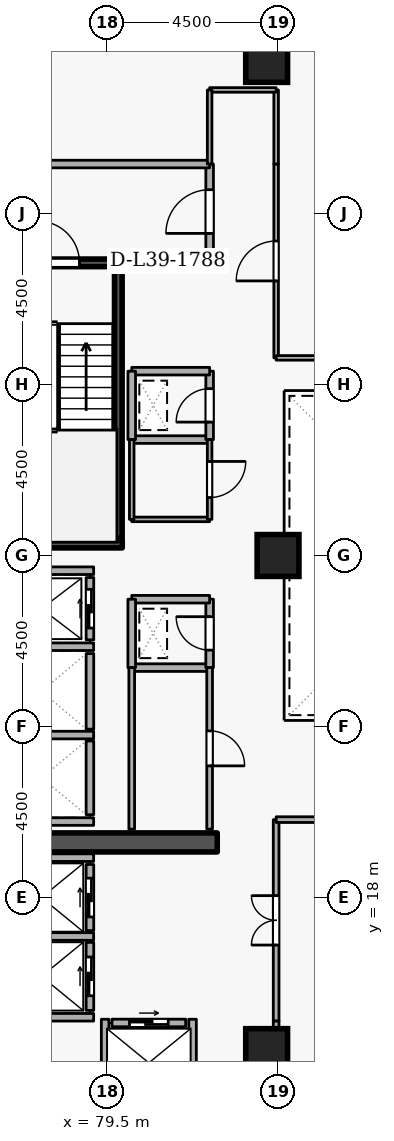
"""IFC4 building model, lengths in metres.
Left out: names, types, materials, properties, quantities, classifications, styles, units other than length and angle.
Written with IfcOpenShell. Run it as: python <this file> out.ifc"""

import sys

from ifc_helpers import new_model, si_unit, direction, frame, frame_2d, origin, origin_2d, place, context, subcontext, project, spatial, rectangle, extrude, element, fill, save


model = new_model("IFC4")
c1 = context("Model", 3, precision=1e-05, world=origin(), true_north=direction((0.0, 1.0)))
c2 = subcontext(c1, "Body", "Model", "MODEL_VIEW")
j1 = project(units=[si_unit("LENGTHUNIT", "METRE"), si_unit("PLANEANGLEUNIT", "RADIAN")], contexts=[c1])
p1 = place(None, origin())
s1 = spatial("IfcSite", under=j1, at=p1, CompositionType="ELEMENT")
p2 = place(p1, origin())
s2 = spatial("IfcBuilding", under=s1, at=p2, CompositionType="ELEMENT")
p3 = place(p2, frame((0.0, 0.0, 149.1)))
s3 = spatial("IfcBuildingStorey", under=s2, at=p3, CompositionType="ELEMENT", Elevation=149.1)
p4 = place(p3, frame((76.6, 19.45, 0.0), z_axis=(0.0, 0.0, 1.0), x_axis=(1.0, 0.0, 0.0)))
e1 = element("IfcWall", 1, at=p4, inside=s3, PredefinedType="SHEAR", context=c2, shape_type="SweptSolid", body=[
    extrude(rectangle(XDim=5.8, YDim=0.5, at=frame_2d((2.9, 0.0))), origin(), (0.0, 0.0, 1.0), 3.6),
])
for number, where, z_axis, x_axis in (
    (2, (83.7, 14.0, 0.0), (0.0, 0.0, 1.0), (1.0, 0.0, 0.0)),
    (3, (83.7, 40.0, 0.0), (0.0, 0.0, 1.0), (1.0, 0.0, 0.0)),
    (4, (84.0, 27.0, 0.0), (0.0, 0.0, 1.0), (1.0, 0.0, 0.0)),
):
    element("IfcColumn", number, at=place(p3, frame(where, z_axis=z_axis, x_axis=x_axis)), inside=s3, PredefinedType="COLUMN", context=c2, shape_type="SweptSolid", body=[
        extrude(rectangle(XDim=1.1, YDim=1.1, at=origin_2d()), origin(), (0.0, 0.0, 1.0), 3.6),
    ])
p5 = place(p3, frame((79.05, 24.78, 0.0), z_axis=(0.0, 0.0, 1.0), x_axis=(0.0, 1.0, 0.0)))
e5 = element("IfcWall", 5, at=p5, inside=s3, PredefinedType="STANDARD", context=c2, shape_type="SweptSolid", body=[
    extrude(rectangle(XDim=1.64, YDim=0.2, at=frame_2d((0.82, 0.0))), origin(), (0.0, 0.0, 1.0), 3.3),
])
p6 = place(p5, frame((0.31, 0.0, 0.0)))
e6 = element("IfcOpeningElement", 6, at=p6, cuts=e5, PredefinedType="OPENING", context=c2, shape_type="SweptSolid", body=[
    extrude(rectangle(XDim=1.02, YDim=2.06, at=frame_2d((0.51, 1.03))), frame((0.0, 0.11, 0.0), z_axis=(0.0, -1.0, 0.0), x_axis=(1.0, 0.0, 0.0)), (0.0, 0.0, 1.0), 0.22),
])
p7 = place(p3, frame((79.05, 22.43, 0.0), z_axis=(0.0, 0.0, 1.0), x_axis=(0.0, 1.0, 0.0)))
e7 = element("IfcWall", 7, at=p7, inside=s3, PredefinedType="STANDARD", context=c2, shape_type="SweptSolid", body=[
    extrude(rectangle(XDim=1.99, YDim=0.2, at=frame_2d((0.995, 0.0))), origin(), (0.0, 0.0, 1.0), 3.3),
])
p8 = place(p3, frame((79.05, 20.18, 0.0), z_axis=(0.0, 0.0, 1.0), x_axis=(0.0, 1.0, 0.0)))
e8 = element("IfcWall", 8, at=p8, inside=s3, PredefinedType="STANDARD", context=c2, shape_type="SweptSolid", body=[
    extrude(rectangle(XDim=1.94, YDim=0.2, at=frame_2d((0.97, 0.0))), origin(), (0.0, 0.0, 1.0), 3.3),
])
p9 = place(p3, frame((79.05, 17.13, 0.0), z_axis=(0.0, 0.0, 1.0), x_axis=(0.0, 1.0, 0.0)))
e9 = element("IfcWall", 9, at=p9, inside=s3, PredefinedType="STANDARD", context=c2, shape_type="SweptSolid", body=[
    extrude(rectangle(XDim=1.74, YDim=0.2, at=frame_2d((0.87, 0.0))), origin(), (0.0, 0.0, 1.0), 3.3),
])
p10 = place(p9, frame((0.36, 0.0, 0.0)))
e10 = element("IfcOpeningElement", 10, at=p10, cuts=e9, PredefinedType="OPENING", context=c2, shape_type="SweptSolid", body=[
    extrude(rectangle(XDim=1.02, YDim=2.06, at=frame_2d((0.51, 1.03))), frame((0.0, 0.11, 0.0), z_axis=(0.0, -1.0, 0.0), x_axis=(1.0, 0.0, 0.0)), (0.0, 0.0, 1.0), 0.22),
])
p11 = place(p3, frame((79.05, 15.03, 0.0), z_axis=(0.0, 0.0, 1.0), x_axis=(0.0, 1.0, 0.0)))
e11 = element("IfcWall", 11, at=p11, inside=s3, PredefinedType="STANDARD", context=c2, shape_type="SweptSolid", body=[
    extrude(rectangle(XDim=1.79, YDim=0.2, at=frame_2d((0.895, 0.0))), origin(), (0.0, 0.0, 1.0), 3.3),
])
p12 = place(p11, frame((0.385, 0.0, 0.0)))
e12 = element("IfcOpeningElement", 12, at=p12, cuts=e11, PredefinedType="OPENING", context=c2, shape_type="SweptSolid", body=[
    extrude(rectangle(XDim=1.02, YDim=2.06, at=frame_2d((0.51, 1.03))), frame((0.0, 0.11, 0.0), z_axis=(0.0, -1.0, 0.0), x_axis=(1.0, 0.0, 0.0)), (0.0, 0.0, 1.0), 0.22),
])
p13 = place(p3, frame((79.63, 14.7, 0.0), z_axis=(0.0, 0.0, 1.0), x_axis=(1.0, 0.0, 0.0)))
e13 = element("IfcWall", 13, at=p13, inside=s3, PredefinedType="STANDARD", context=c2, shape_type="SweptSolid", body=[
    extrude(rectangle(XDim=1.94, YDim=0.2, at=frame_2d((0.97, 0.0))), origin(), (0.0, 0.0, 1.0), 3.3),
])
p14 = place(p13, frame((0.46, 0.0, 0.0)))
e14 = element("IfcOpeningElement", 14, at=p14, cuts=e13, PredefinedType="OPENING", context=c2, shape_type="SweptSolid", body=[
    extrude(rectangle(XDim=1.02, YDim=2.06, at=frame_2d((0.51, 1.03))), frame((0.0, 0.11, 0.0), z_axis=(0.0, -1.0, 0.0), x_axis=(1.0, 0.0, 0.0)), (0.0, 0.0, 1.0), 0.22),
])
for number, where, z_axis, x_axis in (
    (15, (76.612, 26.6, 0.0), (0.0, 0.0, 1.0), (1.0, 0.0, 0.0)),
    (16, (76.612, 24.6, 0.0), (0.0, 0.0, 1.0), (1.0, 0.0, 0.0)),
    (17, (76.612, 22.275, 0.0), (0.0, 0.0, 1.0), (1.0, 0.0, 0.0)),
    (18, (76.612, 20.0, 0.0), (0.0, 0.0, 1.0), (1.0, 0.0, 0.0)),
):
    element("IfcWall", number, at=place(p3, frame(where, z_axis=z_axis, x_axis=x_axis)), inside=s3, PredefinedType="STANDARD", context=c2, shape_type="SweptSolid", body=[
        extrude(rectangle(XDim=2.536, YDim=0.2, at=frame_2d((1.268, 0.0))), origin(), (0.0, 0.0, 1.0), 3.3),
    ])
p15 = place(p3, frame((76.402, 19.05, 0.0), z_axis=(0.0, 0.0, 1.0), x_axis=(1.0, 0.0, 0.0)))
e19 = element("IfcWall", 19, at=p15, inside=s3, PredefinedType="STANDARD", context=c2, shape_type="SweptSolid", body=[
    extrude(rectangle(XDim=2.746, YDim=0.2, at=frame_2d((1.373, 0.0))), origin(), (0.0, 0.0, 1.0), 2.505),
])
p16 = place(p3, frame((76.402, 16.975, 0.0), z_axis=(0.0, 0.0, 1.0), x_axis=(1.0, 0.0, 0.0)))
e20 = element("IfcWall", 20, at=p16, inside=s3, PredefinedType="STANDARD", context=c2, shape_type="SweptSolid", body=[
    extrude(rectangle(XDim=2.746, YDim=0.2, at=frame_2d((1.373, 0.0))), origin(), (0.0, 0.0, 1.0), 3.3),
])
p17 = place(p3, frame((76.512, 14.85, 0.0), z_axis=(0.0, 0.0, 1.0), x_axis=(1.0, 0.0, 0.0)))
e21 = element("IfcWall", 21, at=p17, inside=s3, PredefinedType="STANDARD", context=c2, shape_type="SweptSolid", body=[
    extrude(rectangle(XDim=2.636, YDim=0.2, at=frame_2d((1.318, 0.0))), origin(), (0.0, 0.0, 1.0), 3.3),
])
for number, where, z_axis, x_axis in (
    (22, (81.75, 12.612, 0.0), (0.0, 0.0, 1.0), (0.0, 1.0, 0.0)),
    (23, (79.45, 12.612, 0.0), (0.0, 0.0, 1.0), (0.0, 1.0, 0.0)),
):
    element("IfcWall", number, at=place(p3, frame(where, z_axis=z_axis, x_axis=x_axis)), inside=s3, PredefinedType="STANDARD", context=c2, shape_type="SweptSolid", body=[
        extrude(rectangle(XDim=2.186, YDim=0.2, at=frame_2d((1.093, 0.0))), origin(), (0.0, 0.0, 1.0), 3.3),
    ])
p18 = place(p3, frame((76.55, 34.7, 0.0), z_axis=(0.0, 0.0, 1.0), x_axis=(1.0, 0.0, 0.0)))
e24 = element("IfcWall", 24, at=p18, inside=s3, PredefinedType="SHEAR", context=c2, shape_type="SweptSolid", body=[
    extrude(rectangle(XDim=3.35, YDim=0.2, at=frame_2d((1.675, 0.0))), origin(), (0.0, 0.0, 1.0), 3.6),
])
p19 = place(p18, frame((1.125, 0.0, 0.0)))
e25 = element("IfcOpeningElement", 25, at=p19, cuts=e24, PredefinedType="OPENING", context=c2, shape_type="SweptSolid", body=[
    extrude(rectangle(XDim=1.1, YDim=2.1, at=frame_2d((0.55, 1.05))), frame((0.0, 0.11, 0.0), z_axis=(0.0, -1.0, 0.0), x_axis=(1.0, 0.0, 0.0)), (0.0, 0.0, 1.0), 0.22),
])
p20 = place(p3, frame((79.9, 27.3, 0.0), z_axis=(0.0, 0.0, 1.0), x_axis=(-1.0, 0.0, 0.0)))
e26 = element("IfcWall", 26, at=p20, inside=s3, PredefinedType="SHEAR", context=c2, shape_type="SweptSolid", body=[
    extrude(rectangle(XDim=3.35, YDim=0.2, at=frame_2d((1.675, 0.0))), origin(), (0.0, 0.0, 1.0), 3.6),
])
p21 = place(p3, frame((79.797, 27.45, 0.0), z_axis=(0.0, 0.0, 1.0), x_axis=(0.0, 1.0, 0.0)))
e27 = element("IfcWall", 27, at=p21, inside=s3, PredefinedType="SHEAR", context=c2, shape_type="SweptSolid", body=[
    extrude(rectangle(XDim=7.1, YDim=0.2, at=frame_2d((3.55, 0.0))), origin(), (0.0, 0.0, 1.0), 3.6),
])
p22 = place(p3, frame((79.9, 34.8, 0.0), z_axis=(0.0, 0.0, 1.0), x_axis=(1.0, 0.0, 0.0)))
e28 = element("IfcWall", 28, at=p22, inside=s3, PredefinedType="STANDARD", context=c2, shape_type="SweptSolid", body=[
    extrude(rectangle(XDim=2.3, YDim=0.2, at=frame_2d((1.15, 0.0))), origin(), (0.0, 0.0, 1.0), 2.505),
])
p23 = place(p3, frame((82.2, 34.8, 0.0), z_axis=(0.0, 0.0, 1.0), x_axis=(0.0, 1.0, 0.0)))
e29 = element("IfcWall", 29, at=p23, inside=s3, PredefinedType="STANDARD", context=c2, shape_type="SweptSolid", body=[
    extrude(rectangle(XDim=2.5, YDim=0.2, at=frame_2d((1.25, 0.0))), origin(), (0.0, 0.0, 1.0), 3.3),
])
p24 = place(p23, frame((0.675, 0.0, 0.0)))
e30 = element("IfcOpeningElement", 30, at=p24, cuts=e29, PredefinedType="OPENING", context=c2, shape_type="SweptSolid", body=[
    extrude(rectangle(XDim=1.15, YDim=2.1, at=frame_2d((0.575, 1.05))), frame((0.0, 0.11, 0.0), z_axis=(0.0, -1.0, 0.0), x_axis=(1.0, 0.0, 0.0)), (0.0, 0.0, 1.0), 0.22),
])
p25 = place(p3, frame((82.2, 37.3, 0.0), z_axis=(0.0, 0.0, 1.0), x_axis=(-1.0, 0.0, 0.0)))
e31 = element("IfcWall", 31, at=p25, inside=s3, PredefinedType="STANDARD", context=c2, shape_type="SweptSolid", body=[
    extrude(rectangle(XDim=5.7, YDim=0.2, at=frame_2d((2.85, 0.0))), origin(), (0.0, 0.0, 1.0), 3.3),
])
p26 = place(p3, frame((80.15, 24.05, 0.0), z_axis=(0.0, 0.0, 1.0), x_axis=(1.0, 0.0, 0.0)))
e32 = element("IfcWall", 32, at=p26, inside=s3, PredefinedType="STANDARD", context=c2, shape_type="SweptSolid", body=[
    extrude(rectangle(XDim=2.05, YDim=0.2, at=frame_2d((1.025, 0.0))), origin(), (0.0, 0.0, 1.0), 3.3),
])
p27 = place(p3, frame((82.2, 24.05, 0.0), z_axis=(0.0, 0.0, 1.0), x_axis=(0.0, 1.0, 0.0)))
e33 = element("IfcWall", 33, at=p27, inside=s3, PredefinedType="STANDARD", context=c2, shape_type="SweptSolid", body=[
    extrude(rectangle(XDim=1.8, YDim=0.2, at=frame_2d((0.9, 0.0))), origin(), (0.0, 0.0, 1.0), 3.3),
])
p28 = place(p27, frame((0.46, 0.0, 0.0)))
e34 = element("IfcOpeningElement", 34, at=p28, cuts=e33, PredefinedType="OPENING", context=c2, shape_type="SweptSolid", body=[
    extrude(rectangle(XDim=0.88, YDim=2.04, at=frame_2d((0.44, 1.02))), frame((0.0, 0.11, 0.0), z_axis=(0.0, -1.0, 0.0), x_axis=(1.0, 0.0, 0.0)), (0.0, 0.0, 1.0), 0.22),
])
p29 = place(p3, frame((82.2, 25.85, 0.0), z_axis=(0.0, 0.0, 1.0), x_axis=(-1.0, 0.0, 0.0)))
e35 = element("IfcWall", 35, at=p29, inside=s3, PredefinedType="STANDARD", context=c2, shape_type="SweptSolid", body=[
    extrude(rectangle(XDim=2.05, YDim=0.2, at=frame_2d((1.025, 0.0))), origin(), (0.0, 0.0, 1.0), 3.3),
])
p30 = place(p3, frame((80.15, 25.85, 0.0), z_axis=(0.0, 0.0, 1.0), x_axis=(0.0, -1.0, 0.0)))
e36 = element("IfcWall", 36, at=p30, inside=s3, PredefinedType="STANDARD", context=c2, shape_type="SweptSolid", body=[
    extrude(rectangle(XDim=1.8, YDim=0.2, at=frame_2d((0.9, 0.0))), origin(), (0.0, 0.0, 1.0), 3.3),
])
p31 = place(p3, frame((80.15, 30.05, 0.0), z_axis=(0.0, 0.0, 1.0), x_axis=(1.0, 0.0, 0.0)))
e37 = element("IfcWall", 37, at=p31, inside=s3, PredefinedType="STANDARD", context=c2, shape_type="SweptSolid", body=[
    extrude(rectangle(XDim=2.05, YDim=0.2, at=frame_2d((1.025, 0.0))), origin(), (0.0, 0.0, 1.0), 3.3),
])
p32 = place(p3, frame((82.2, 30.05, 0.0), z_axis=(0.0, 0.0, 1.0), x_axis=(0.0, 1.0, 0.0)))
e38 = element("IfcWall", 38, at=p32, inside=s3, PredefinedType="STANDARD", context=c2, shape_type="SweptSolid", body=[
    extrude(rectangle(XDim=1.8, YDim=0.2, at=frame_2d((0.9, 0.0))), origin(), (0.0, 0.0, 1.0), 3.3),
])
p33 = place(p32, frame((0.46, 0.0, 0.0)))
e39 = element("IfcOpeningElement", 39, at=p33, cuts=e38, PredefinedType="OPENING", context=c2, shape_type="SweptSolid", body=[
    extrude(rectangle(XDim=0.88, YDim=2.04, at=frame_2d((0.44, 1.02))), frame((0.0, 0.11, 0.0), z_axis=(0.0, -1.0, 0.0), x_axis=(1.0, 0.0, 0.0)), (0.0, 0.0, 1.0), 0.22),
])
p34 = place(p3, frame((82.2, 31.85, 0.0), z_axis=(0.0, 0.0, 1.0), x_axis=(-1.0, 0.0, 0.0)))
e40 = element("IfcWall", 40, at=p34, inside=s3, PredefinedType="STANDARD", context=c2, shape_type="SweptSolid", body=[
    extrude(rectangle(XDim=2.05, YDim=0.2, at=frame_2d((1.025, 0.0))), origin(), (0.0, 0.0, 1.0), 3.3),
])
p35 = place(p3, frame((80.15, 31.85, 0.0), z_axis=(0.0, 0.0, 1.0), x_axis=(0.0, -1.0, 0.0)))
e41 = element("IfcWall", 41, at=p35, inside=s3, PredefinedType="STANDARD", context=c2, shape_type="SweptSolid", body=[
    extrude(rectangle(XDim=1.8, YDim=0.2, at=frame_2d((0.9, 0.0))), origin(), (0.0, 0.0, 1.0), 3.3),
])
p36 = place(p3, frame((80.15, 19.8, 0.0), z_axis=(0.0, 0.0, 1.0), x_axis=(0.0, 1.0, 0.0)))
e42 = element("IfcWall", 42, at=p36, inside=s3, PredefinedType="PARTITIONING", context=c2, shape_type="SweptSolid", body=[
    extrude(rectangle(XDim=4.25, YDim=0.15, at=frame_2d((2.125, 0.0))), origin(), (0.0, 0.0, 1.0), 3.3),
])
p37 = place(p3, frame((82.2, 24.05, 0.0), z_axis=(0.0, 0.0, 1.0), x_axis=(0.0, -1.0, 0.0)))
e43 = element("IfcWall", 43, at=p37, inside=s3, PredefinedType="PARTITIONING", context=c2, shape_type="SweptSolid", body=[
    extrude(rectangle(XDim=4.25, YDim=0.15, at=frame_2d((2.125, 0.0))), origin(), (0.0, 0.0, 1.0), 3.3),
])
p38 = place(p37, frame((1.665, 0.0, 0.0)))
e44 = element("IfcOpeningElement", 44, at=p38, cuts=e43, PredefinedType="OPENING", context=c2, shape_type="SweptSolid", body=[
    extrude(rectangle(XDim=0.92, YDim=2.08, at=frame_2d((0.46, 1.04))), frame((0.0, 0.085, 0.0), z_axis=(0.0, -1.0, 0.0), x_axis=(1.0, 0.0, 0.0)), (0.0, 0.0, 1.0), 0.17),
])
p39 = place(p3, frame((82.2, 27.95, 0.0), z_axis=(0.0, 0.0, 1.0), x_axis=(-1.0, 0.0, 0.0)))
e45 = element("IfcWall", 45, at=p39, inside=s3, PredefinedType="PARTITIONING", context=c2, shape_type="SweptSolid", body=[
    extrude(rectangle(XDim=2.05, YDim=0.12, at=frame_2d((1.025, 0.0))), origin(), (0.0, 0.0, 1.0), 3.3),
])
p40 = place(p3, frame((80.15, 27.95, 0.0), z_axis=(0.0, 0.0, 1.0), x_axis=(0.0, 1.0, 0.0)))
e46 = element("IfcWall", 46, at=p40, inside=s3, PredefinedType="PARTITIONING", context=c2, shape_type="SweptSolid", body=[
    extrude(rectangle(XDim=2.1, YDim=0.12, at=frame_2d((1.05, 0.0))), origin(), (0.0, 0.0, 1.0), 3.3),
])
p41 = place(p3, frame((82.2, 30.05, 0.0), z_axis=(0.0, 0.0, 1.0), x_axis=(0.0, -1.0, 0.0)))
e47 = element("IfcWall", 47, at=p41, inside=s3, PredefinedType="PARTITIONING", context=c2, shape_type="SweptSolid", body=[
    extrude(rectangle(XDim=2.1, YDim=0.12, at=frame_2d((1.05, 0.0))), origin(), (0.0, 0.0, 1.0), 3.3),
])
p42 = place(p41, frame((0.575, 0.0, 0.0)))
e48 = element("IfcOpeningElement", 48, at=p42, cuts=e47, PredefinedType="OPENING", context=c2, shape_type="SweptSolid", body=[
    extrude(rectangle(XDim=0.95, YDim=2.1, at=frame_2d((0.475, 1.05))), frame((0.0, 0.07, 0.0), z_axis=(0.0, -1.0, 0.0), x_axis=(1.0, 0.0, 0.0)), (0.0, 0.0, 1.0), 0.14),
])
p43 = place(p3, frame((83.95, 14.75, 0.0), z_axis=(0.0, 0.0, 1.0), x_axis=(0.0, 1.0, 0.0)))
e49 = element("IfcWall", 49, at=p43, inside=s3, PredefinedType="PARTITIONING", context=c2, shape_type="SweptSolid", body=[
    extrude(rectangle(XDim=5.3, YDim=0.15, at=frame_2d((2.65, 0.0))), origin(), (0.0, 0.0, 1.0), 3.3),
])
p44 = place(p43, frame((2.0, 0.0, 0.0)))
e50 = element("IfcOpeningElement", 50, at=p44, cuts=e49, PredefinedType="OPENING", context=c2, shape_type="SweptSolid", body=[
    extrude(rectangle(XDim=1.3, YDim=2.12, at=frame_2d((0.65, 1.06))), frame((0.0, 0.085, 0.0), z_axis=(0.0, -1.0, 0.0), x_axis=(1.0, 0.0, 0.0)), (0.0, 0.0, 1.0), 0.17),
])
p45 = place(p3, frame((83.95, 20.05, 0.0), z_axis=(0.0, 0.0, 1.0), x_axis=(1.0, 0.0, 0.0)))
e51 = element("IfcWall", 51, at=p45, inside=s3, PredefinedType="PARTITIONING", context=c2, shape_type="SweptSolid", body=[
    extrude(rectangle(XDim=4.55, YDim=0.15, at=frame_2d((2.275, 0.0))), origin(), (0.0, 0.0, 1.0), 3.3),
])
p46 = place(p3, frame((83.95, 12.4, 0.0), z_axis=(0.0, 0.0, 1.0), x_axis=(0.0, 1.0, 0.0)))
e52 = element("IfcWall", 52, at=p46, inside=s3, PredefinedType="PARTITIONING", context=c2, shape_type="SweptSolid", body=[
    extrude(rectangle(XDim=2.35, YDim=0.15, at=frame_2d((1.175, 0.0))), origin(), (0.0, 0.0, 1.0), 3.3),
])
p47 = place(p3, frame((83.95, 32.2, 0.0), z_axis=(0.0, 0.0, 1.0), x_axis=(0.0, 1.0, 0.0)))
e53 = element("IfcWall", 53, at=p47, inside=s3, PredefinedType="PARTITIONING", context=c2, shape_type="SweptSolid", body=[
    extrude(rectangle(XDim=5.1, YDim=0.12, at=frame_2d((2.55, 0.0))), origin(), (0.0, 0.0, 1.0), 3.3),
])
p48 = place(p47, frame((2.025, 0.0, 0.0)))
e54 = element("IfcOpeningElement", 54, at=p48, cuts=e53, PredefinedType="OPENING", context=c2, shape_type="SweptSolid", body=[
    extrude(rectangle(XDim=1.05, YDim=2.1, at=frame_2d((0.525, 1.05))), frame((0.0, 0.07, 0.0), z_axis=(0.0, -1.0, 0.0), x_axis=(1.0, 0.0, 0.0)), (0.0, 0.0, 1.0), 0.14),
])
p49 = place(p3, frame((83.95, 37.3, 0.0), z_axis=(0.0, 0.0, 1.0), x_axis=(0.0, 1.0, 0.0)))
e55 = element("IfcWall", 55, at=p49, inside=s3, PredefinedType="PARTITIONING", context=c2, shape_type="SweptSolid", body=[
    extrude(rectangle(XDim=1.95, YDim=0.12, at=frame_2d((0.975, 0.0))), origin(), (0.0, 0.0, 1.0), 3.3),
])
p50 = place(p3, frame((83.95, 39.25, 0.0), z_axis=(0.0, 0.0, 1.0), x_axis=(-1.0, 0.0, 0.0)))
e56 = element("IfcWall", 56, at=p50, inside=s3, PredefinedType="PARTITIONING", context=c2, shape_type="SweptSolid", body=[
    extrude(rectangle(XDim=1.75, YDim=0.12, at=frame_2d((0.875, 0.0))), origin(), (0.0, 0.0, 1.0), 3.3),
])
p51 = place(p3, frame((82.2, 39.25, 0.0), z_axis=(0.0, 0.0, 1.0), x_axis=(0.0, -1.0, 0.0)))
e57 = element("IfcWall", 57, at=p51, inside=s3, PredefinedType="PARTITIONING", context=c2, shape_type="SweptSolid", body=[
    extrude(rectangle(XDim=1.95, YDim=0.12, at=frame_2d((0.975, 0.0))), origin(), (0.0, 0.0, 1.0), 3.3),
])
p52 = place(p3, frame((88.5, 32.2, 0.0), z_axis=(0.0, 0.0, 1.0), x_axis=(-1.0, 0.0, 0.0)))
e58 = element("IfcWall", 58, at=p52, inside=s3, PredefinedType="PARTITIONING", context=c2, shape_type="SweptSolid", body=[
    extrude(rectangle(XDim=4.55, YDim=0.12, at=frame_2d((2.275, 0.0))), origin(), (0.0, 0.0, 1.0), 3.3),
])
p53 = place(p6, origin())
e59 = element("IfcDoor", 59, at=p53, inside=s3, OperationType="SLIDING_TO_LEFT", PredefinedType="DOOR", context=c2, shape_type="SweptSolid", body=[
    extrude(rectangle(XDim=1.02, YDim=2.06, at=frame_2d((0.51, 1.03))), frame((0.0, 0.025, 0.0), z_axis=(0.0, -1.0, 0.0), x_axis=(1.0, 0.0, 0.0)), (0.0, 0.0, 1.0), 0.05),
])
fill(e6, e59)
p54 = place(p10, origin())
e60 = element("IfcDoor", 60, at=p54, inside=s3, OperationType="SLIDING_TO_LEFT", PredefinedType="DOOR", context=c2, shape_type="SweptSolid", body=[
    extrude(rectangle(XDim=1.02, YDim=2.06, at=frame_2d((0.51, 1.03))), frame((0.0, 0.025, 0.0), z_axis=(0.0, -1.0, 0.0), x_axis=(1.0, 0.0, 0.0)), (0.0, 0.0, 1.0), 0.05),
])
fill(e10, e60)
p55 = place(p12, origin())
e61 = element("IfcDoor", 61, at=p55, inside=s3, OperationType="SLIDING_TO_LEFT", PredefinedType="DOOR", context=c2, shape_type="SweptSolid", body=[
    extrude(rectangle(XDim=1.02, YDim=2.06, at=frame_2d((0.51, 1.03))), frame((0.0, 0.025, 0.0), z_axis=(0.0, -1.0, 0.0), x_axis=(1.0, 0.0, 0.0)), (0.0, 0.0, 1.0), 0.05),
])
fill(e12, e61)
p56 = place(p14, origin())
e62 = element("IfcDoor", 62, at=p56, inside=s3, OperationType="SLIDING_TO_LEFT", PredefinedType="DOOR", context=c2, shape_type="SweptSolid", body=[
    extrude(rectangle(XDim=1.02, YDim=2.06, at=frame_2d((0.51, 1.03))), frame((0.0, 0.025, 0.0), z_axis=(0.0, -1.0, 0.0), x_axis=(1.0, 0.0, 0.0)), (0.0, 0.0, 1.0), 0.05),
])
fill(e14, e62)
p57 = place(p19, origin())
e63 = element("IfcDoor", 63, at=p57, inside=s3, OperationType="SINGLE_SWING_LEFT", PredefinedType="DOOR", context=c2, shape_type="SweptSolid", body=[
    extrude(rectangle(XDim=1.1, YDim=2.1, at=frame_2d((0.55, 1.05))), frame((0.0, 0.025, 0.0), z_axis=(0.0, -1.0, 0.0), x_axis=(1.0, 0.0, 0.0)), (0.0, 0.0, 1.0), 0.05),
])
fill(e25, e63)
p58 = place(p24, origin())
e64 = element("IfcDoor", 64, at=p58, inside=s3, OperationType="SINGLE_SWING_LEFT", PredefinedType="DOOR", context=c2, shape_type="SweptSolid", body=[
    extrude(rectangle(XDim=1.15, YDim=2.1, at=frame_2d((0.575, 1.05))), frame((0.0, 0.025, 0.0), z_axis=(0.0, -1.0, 0.0), x_axis=(1.0, 0.0, 0.0)), (0.0, 0.0, 1.0), 0.05),
])
fill(e30, e64)
p59 = place(p28, origin())
e65 = element("IfcDoor", 65, at=p59, inside=s3, OperationType="SINGLE_SWING_RIGHT", PredefinedType="DOOR", context=c2, shape_type="SweptSolid", body=[
    extrude(rectangle(XDim=0.88, YDim=2.04, at=frame_2d((0.44, 1.02))), frame((0.0, 0.025, 0.0), z_axis=(0.0, -1.0, 0.0), x_axis=(1.0, 0.0, 0.0)), (0.0, 0.0, 1.0), 0.05),
])
fill(e34, e65)
p60 = place(p33, origin())
e66 = element("IfcDoor", 66, at=p60, inside=s3, OperationType="SINGLE_SWING_LEFT", PredefinedType="DOOR", context=c2, shape_type="SweptSolid", body=[
    extrude(rectangle(XDim=0.88, YDim=2.04, at=frame_2d((0.44, 1.02))), frame((0.0, 0.025, 0.0), z_axis=(0.0, -1.0, 0.0), x_axis=(1.0, 0.0, 0.0)), (0.0, 0.0, 1.0), 0.05),
])
fill(e39, e66)
p61 = place(p38, origin())
e67 = element("IfcDoor", 67, at=p61, inside=s3, OperationType="SINGLE_SWING_RIGHT", PredefinedType="DOOR", context=c2, shape_type="SweptSolid", body=[
    extrude(rectangle(XDim=0.92, YDim=2.08, at=frame_2d((0.46, 1.04))), frame((0.0, 0.025, 0.0), z_axis=(0.0, -1.0, 0.0), x_axis=(1.0, 0.0, 0.0)), (0.0, 0.0, 1.0), 0.05),
])
fill(e44, e67)
p62 = place(p42, origin())
e68 = element("IfcDoor", 68, at=p62, inside=s3, OperationType="SINGLE_SWING_LEFT", PredefinedType="DOOR", context=c2, shape_type="SweptSolid", body=[
    extrude(rectangle(XDim=0.95, YDim=2.1, at=frame_2d((0.475, 1.05))), frame((0.0, 0.025, 0.0), z_axis=(0.0, -1.0, 0.0), x_axis=(1.0, 0.0, 0.0)), (0.0, 0.0, 1.0), 0.05),
])
fill(e48, e68)
p63 = place(p44, origin())
e69 = element("IfcDoor", 69, at=p63, inside=s3, OperationType="DOUBLE_DOOR_SINGLE_SWING", PredefinedType="DOOR", context=c2, shape_type="SweptSolid", body=[
    extrude(rectangle(XDim=1.3, YDim=2.12, at=frame_2d((0.65, 1.06))), frame((0.0, 0.025, 0.0), z_axis=(0.0, -1.0, 0.0), x_axis=(1.0, 0.0, 0.0)), (0.0, 0.0, 1.0), 0.05),
])
fill(e50, e69)
p64 = place(p48, origin())
e70 = element("IfcDoor", 70, at=p64, inside=s3, OperationType="SINGLE_SWING_LEFT", PredefinedType="DOOR", context=c2, shape_type="SweptSolid", body=[
    extrude(rectangle(XDim=1.05, YDim=2.1, at=frame_2d((0.525, 1.05))), frame((0.0, 0.025, 0.0), z_axis=(0.0, -1.0, 0.0), x_axis=(1.0, 0.0, 0.0)), (0.0, 0.0, 1.0), 0.05),
])
fill(e54, e70)
save(model, sys.argv[1])
